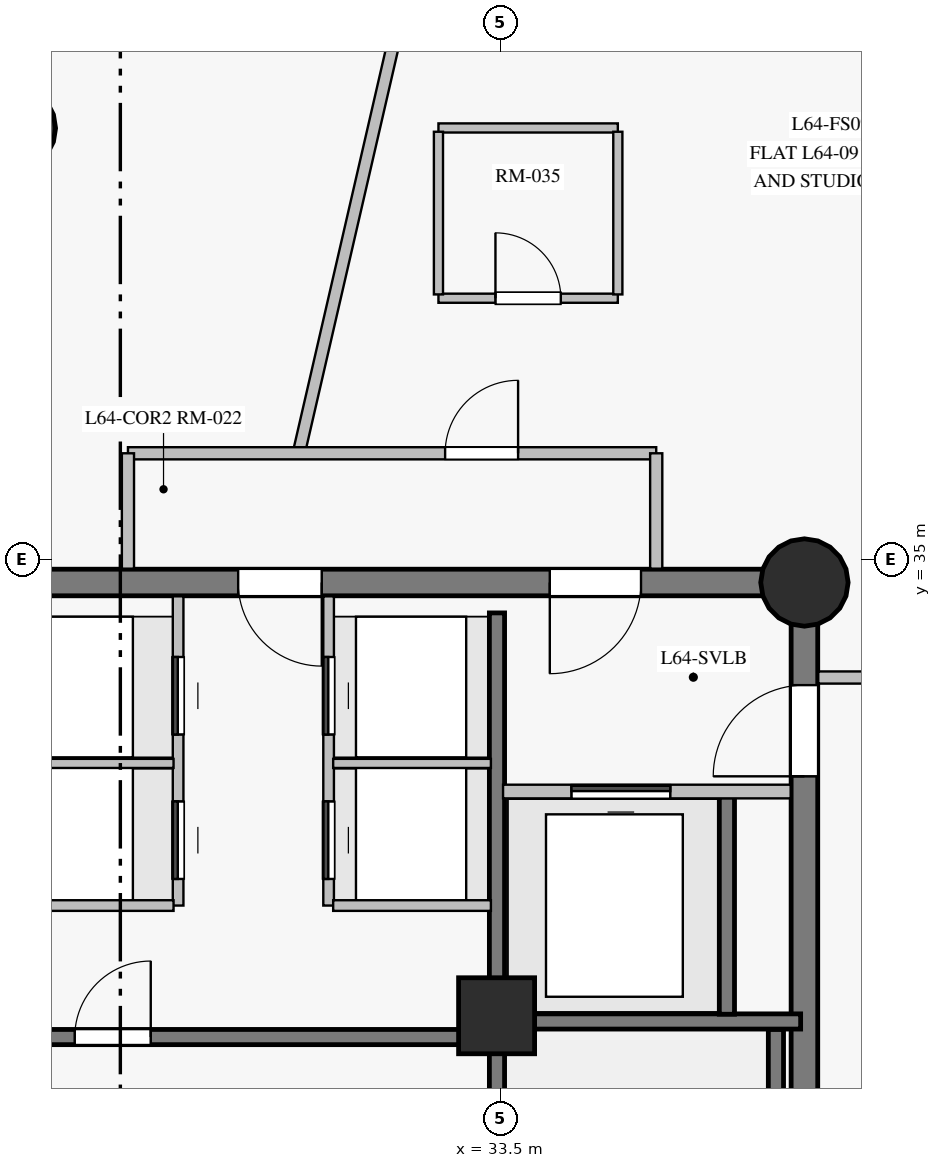
"""IFC4 building model, lengths in metres.
Left out: names, types, materials, properties, quantities, classifications, styles, units other than length and angle.
Written with IfcOpenShell. Run it as: python <this file> out.ifc"""

import sys

from ifc_helpers import new_model, si_unit, direction, frame, frame_2d, origin, origin_with_axes, origin_2d, place, context, subcontext, project, spatial, rectangle, circle, extrude, source, transform, mapped, element, fill, save


model = new_model("IFC4")
c1 = context("Model", 3, precision=1e-05, world=origin(), true_north=direction((0.0, 1.0)))
c2 = subcontext(c1, "Body", "Model", "MODEL_VIEW")
j1 = project(units=[si_unit("LENGTHUNIT", "METRE"), si_unit("PLANEANGLEUNIT", "RADIAN")], contexts=[c1])
p1 = place(None, origin())
s1 = spatial("IfcSite", under=j1, at=p1, CompositionType="ELEMENT")
p2 = place(p1, origin())
s2 = spatial("IfcBuilding", under=s1, at=p2, CompositionType="ELEMENT")
p3 = place(p2, frame((0.0, 0.0, 219.95)))
s3 = spatial("IfcBuildingStorey", under=s2, at=p3, CompositionType="ELEMENT", Elevation=219.95)
p4 = place(p3, frame((37.5, 18.3, 0.0), z_axis=(0.0, 0.0, 1.0), x_axis=(0.0, 1.0, 0.0)))
e1 = element("IfcWall", 1, at=p4, inside=s3, PredefinedType="SHEAR", context=c2, shape_type="SweptSolid", body=[
    extrude(rectangle(XDim=16.4, YDim=0.35, at=frame_2d((8.2, 0.0))), origin(), (0.0, 0.0, 1.0), 2.85),
])
p5 = place(p4, frame((13.85, 0.0, 0.0)))
e2 = element("IfcOpeningElement", 2, at=p5, cuts=e1, PredefinedType="OPENING", context=c2, shape_type="SweptSolid", body=[
    extrude(rectangle(XDim=1.2, YDim=2.15, at=frame_2d((0.6, 1.075))), frame((0.0, 0.185, 0.0), z_axis=(0.0, -1.0, 0.0), x_axis=(1.0, 0.0, 0.0)), (0.0, 0.0, 1.0), 0.37),
])
p6 = place(p3, frame((37.5, 34.7, 0.0), z_axis=(0.0, 0.0, 1.0), x_axis=(-1.0, 0.0, 0.0)))
e3 = element("IfcWall", 3, at=p6, inside=s3, PredefinedType="SHEAR", context=c2, shape_type="SweptSolid", body=[
    extrude(rectangle(XDim=10.95, YDim=0.35, at=frame_2d((5.475, 0.0))), origin(), (0.0, 0.0, 1.0), 2.85),
])
p7 = place(p6, frame((2.15, 0.0, 0.0)))
e4 = element("IfcOpeningElement", 4, at=p7, cuts=e3, PredefinedType="OPENING", context=c2, shape_type="SweptSolid", body=[
    extrude(rectangle(XDim=1.2, YDim=2.15, at=frame_2d((0.6, 1.075))), frame((0.0, 0.185, 0.0), z_axis=(0.0, -1.0, 0.0), x_axis=(1.0, 0.0, 0.0)), (0.0, 0.0, 1.0), 0.37),
])
p8 = place(p6, frame((6.35, 0.0, 0.0)))
e5 = element("IfcOpeningElement", 5, at=p8, cuts=e3, PredefinedType="OPENING", context=c2, shape_type="SweptSolid", body=[
    extrude(rectangle(XDim=1.1, YDim=2.15, at=frame_2d((0.55, 1.075))), frame((0.0, 0.185, 0.0), z_axis=(0.0, -1.0, 0.0), x_axis=(1.0, 0.0, 0.0)), (0.0, 0.0, 1.0), 0.37),
])
m1 = source(origin_with_axes(), c2, "Body", "SweptSolid", [
    extrude(circle(Radius=0.575, at=origin_2d()), origin(), (0.0, 0.0, 1.0), 3.05),
])
p9 = place(p3, frame((37.5, 34.7, 0.0), z_axis=(0.0, 0.0, 1.0), x_axis=(1.0, 0.0, 0.0)))
e6 = element("IfcColumn", 6, at=p9, inside=s3, PredefinedType="COLUMN", context=c2, shape_type="MappedRepresentation", body=[
    mapped(m1, transform((0.0, 0.0, 0.0), scale=1.0)),
])
m2 = source(origin_with_axes(), c2, "Body", "SweptSolid", [
    extrude(rectangle(XDim=1.0, YDim=1.0, at=origin_2d()), origin(), (0.0, 0.0, 1.0), 3.05),
])
p10 = place(p3, frame((33.45, 29.0, 0.0), z_axis=(0.0, 0.0, 1.0), x_axis=(1.0, 0.0, 0.0)))
e7 = element("IfcColumn", 7, at=p10, inside=s3, PredefinedType="COLUMN", context=c2, shape_type="MappedRepresentation", body=[
    mapped(m2, transform((0.0, 0.0, 0.0), scale=1.0)),
])
p11 = place(p3, frame((27.073, 40.677, 0.0), z_axis=(0.0, 0.0, 1.0), x_axis=(1.0, 0.0, 0.0)))
e8 = element("IfcColumn", 8, at=p11, inside=s3, PredefinedType="COLUMN", context=c2, shape_type="MappedRepresentation", body=[
    mapped(m1, transform((0.0, 0.0, 0.0), scale=1.0)),
])
p12 = place(p3, frame((33.455, 18.7, 0.0), z_axis=(0.0, 0.0, 1.0), x_axis=(0.0, 1.0, 0.0)))
e9 = element("IfcWall", 9, at=p12, inside=s3, PredefinedType="SHEAR", context=c2, shape_type="SweptSolid", body=[
    extrude(rectangle(XDim=15.6, YDim=0.2, at=frame_2d((7.8, 0.0))), origin(), (0.0, 0.0, 1.0), 2.85),
])
p13 = place(p12, frame((2.75, 0.0, 0.0)))
e10 = element("IfcOpeningElement", 10, at=p13, cuts=e9, PredefinedType="OPENING", context=c2, shape_type="SweptSolid", body=[
    extrude(rectangle(XDim=1.15, YDim=2.15, at=frame_2d((0.575, 1.075))), frame((0.0, 0.11, 0.0), z_axis=(0.0, -1.0, 0.0), x_axis=(1.0, 0.0, 0.0)), (0.0, 0.0, 1.0), 0.22),
])
p14 = place(p12, frame((0.55, 0.0, 0.0)))
e11 = element("IfcOpeningElement", 11, at=p14, cuts=e9, PredefinedType="OPENING", context=c2, shape_type="SweptSolid", body=[
    extrude(rectangle(XDim=0.94, YDim=2.1, at=frame_2d((0.47, 1.05))), frame((0.0, 0.11, 0.0), z_axis=(0.0, -1.0, 0.0), x_axis=(1.0, 0.0, 0.0)), (0.0, 0.0, 1.0), 0.22),
])
p15 = place(p3, frame((23.7, 28.72, 0.0), z_axis=(0.0, 0.0, 1.0), x_axis=(1.0, 0.0, 0.0)))
e12 = element("IfcWall", 12, at=p15, inside=s3, PredefinedType="SHEAR", context=c2, shape_type="SweptSolid", body=[
    extrude(rectangle(XDim=9.6, YDim=0.2, at=frame_2d((4.8, 0.0))), origin(), (0.0, 0.0, 1.0), 2.85),
])
p16 = place(p15, frame((4.2, 0.0, 0.0)))
e13 = element("IfcOpeningElement", 13, at=p16, cuts=e12, PredefinedType="OPENING", context=c2, shape_type="SweptSolid", body=[
    extrude(rectangle(XDim=1.0, YDim=2.15, at=frame_2d((0.5, 1.075))), frame((0.0, 0.11, 0.0), z_axis=(0.0, -1.0, 0.0), x_axis=(1.0, 0.0, 0.0)), (0.0, 0.0, 1.0), 0.22),
])
p17 = place(p3, frame((37.125, 21.32, 0.0), z_axis=(0.0, 0.0, 1.0), x_axis=(0.0, 1.0, 0.0)))
e14 = element("IfcWall", 14, at=p17, inside=s3, PredefinedType="SHEAR", context=c2, shape_type="SweptSolid", body=[
    extrude(rectangle(XDim=7.5, YDim=0.2, at=frame_2d((3.75, 0.0))), origin(), (0.0, 0.0, 1.0), 2.85),
])
p18 = place(p3, frame((33.455, 28.925, 0.0), z_axis=(0.0, 0.0, 1.0), x_axis=(1.0, 0.0, 0.0)))
e15 = element("IfcWall", 15, at=p18, inside=s3, PredefinedType="SHEAR", context=c2, shape_type="SweptSolid", body=[
    extrude(rectangle(XDim=3.995, YDim=0.2, at=frame_2d((1.998, 0.0))), origin(), (0.0, 0.0, 1.0), 2.85),
])
p19 = place(p3, frame((36.48, 29.02, 0.0), z_axis=(0.0, 0.0, 1.0), x_axis=(0.0, 1.0, 0.0)))
e16 = element("IfcWall", 16, at=p19, inside=s3, PredefinedType="SHEAR", context=c2, shape_type="SweptSolid", body=[
    extrude(rectangle(XDim=2.86, YDim=0.2, at=frame_2d((1.43, 0.0))), origin(), (0.0, 0.0, 1.0), 2.85),
])
p20 = place(p3, frame((30.84, 36.371, 0.0), z_axis=(0.0, 0.0, 1.0), x_axis=(0.224958696118, 0.974368300511, 0.0)))
e17 = element("IfcWall", 17, at=p20, inside=s3, PredefinedType="PARTITIONING", context=c2, shape_type="SweptSolid", body=[
    extrude(rectangle(XDim=11.864, YDim=0.16, at=frame_2d((5.932, 0.0))), origin(), (0.0, 0.0, 1.0), 2.85),
])
p21 = place(p3, frame((28.6, 36.4, 0.0), z_axis=(0.0, 0.0, 1.0), x_axis=(1.0, 0.0, 0.0)))
e18 = element("IfcWall", 18, at=p21, inside=s3, PredefinedType="PARTITIONING", context=c2, shape_type="SweptSolid", body=[
    extrude(rectangle(XDim=6.95, YDim=0.16, at=frame_2d((3.475, 0.0))), origin(), (0.0, 0.0, 1.0), 2.45),
])
p22 = place(p21, frame((4.173, 0.0, 0.0)))
e19 = element("IfcOpeningElement", 19, at=p22, cuts=e18, PredefinedType="OPENING", context=c2, shape_type="SweptSolid", body=[
    extrude(rectangle(XDim=0.96, YDim=2.15, at=frame_2d((0.48, 1.075))), frame((0.0, 0.09, 0.0), z_axis=(0.0, -1.0, 0.0), x_axis=(1.0, 0.0, 0.0)), (0.0, 0.0, 1.0), 0.18),
])
p23 = place(p3, frame((37.682, 33.45, 0.0), z_axis=(0.0, 0.0, 1.0), x_axis=(1.0, 0.0, 0.0)))
e20 = element("IfcWall", 20, at=p23, inside=s3, PredefinedType="PARTITIONING", context=c2, shape_type="SweptSolid", body=[
    extrude(rectangle(XDim=4.118, YDim=0.16, at=frame_2d((2.059, 0.0))), origin(), (0.0, 0.0, 1.0), 2.85),
])
p24 = place(p3, frame((29.26, 30.45, 0.0), z_axis=(0.0, 0.0, 1.0), x_axis=(0.0, 1.0, 0.0)))
e21 = element("IfcWall", 21, at=p24, inside=s3, PredefinedType="PARTITIONING", context=c2, shape_type="SweptSolid", body=[
    extrude(rectangle(XDim=4.068, YDim=0.14, at=frame_2d((2.034, 0.0))), origin(), (0.0, 0.0, 1.0), 2.85),
])
p25 = place(p24, frame((0.35, 0.0, 0.0)))
e22 = element("IfcOpeningElement", 22, at=p25, cuts=e21, PredefinedType="OPENING", context=c2, shape_type="SweptSolid", body=[
    extrude(rectangle(XDim=1.02, YDim=2.15, at=frame_2d((0.51, 1.075))), frame((0.0, 0.08, 0.0), z_axis=(0.0, -1.0, 0.0), x_axis=(1.0, 0.0, 0.0)), (0.0, 0.0, 1.0), 0.16),
])
p26 = place(p24, frame((2.25, 0.0, 0.0)))
e23 = element("IfcOpeningElement", 23, at=p26, cuts=e21, PredefinedType="OPENING", context=c2, shape_type="SweptSolid", body=[
    extrude(rectangle(XDim=1.02, YDim=2.15, at=frame_2d((0.51, 1.075))), frame((0.0, 0.08, 0.0), z_axis=(0.0, -1.0, 0.0), x_axis=(1.0, 0.0, 0.0)), (0.0, 0.0, 1.0), 0.16),
])
p27 = place(p3, frame((31.24, 30.45, 0.0), z_axis=(0.0, 0.0, 1.0), x_axis=(0.0, 1.0, 0.0)))
e24 = element("IfcWall", 24, at=p27, inside=s3, PredefinedType="PARTITIONING", context=c2, shape_type="SweptSolid", body=[
    extrude(rectangle(XDim=4.068, YDim=0.14, at=frame_2d((2.034, 0.0))), origin(), (0.0, 0.0, 1.0), 2.85),
])
p28 = place(p27, frame((0.35, 0.0, 0.0)))
e25 = element("IfcOpeningElement", 25, at=p28, cuts=e24, PredefinedType="OPENING", context=c2, shape_type="SweptSolid", body=[
    extrude(rectangle(XDim=1.02, YDim=2.15, at=frame_2d((0.51, 1.075))), frame((0.0, 0.08, 0.0), z_axis=(0.0, -1.0, 0.0), x_axis=(1.0, 0.0, 0.0)), (0.0, 0.0, 1.0), 0.16),
])
p29 = place(p27, frame((2.25, 0.0, 0.0)))
e26 = element("IfcOpeningElement", 26, at=p29, cuts=e24, PredefinedType="OPENING", context=c2, shape_type="SweptSolid", body=[
    extrude(rectangle(XDim=1.02, YDim=2.15, at=frame_2d((0.51, 1.075))), frame((0.0, 0.08, 0.0), z_axis=(0.0, -1.0, 0.0), x_axis=(1.0, 0.0, 0.0)), (0.0, 0.0, 1.0), 0.16),
])
p30 = place(p3, frame((33.535, 31.95, 0.0), z_axis=(0.0, 0.0, 1.0), x_axis=(1.0, 0.0, 0.0)))
e27 = element("IfcWall", 27, at=p30, inside=s3, PredefinedType="PARTITIONING", context=c2, shape_type="SweptSolid", body=[
    extrude(rectangle(XDim=3.784, YDim=0.18, at=frame_2d((1.892, 0.0))), origin(), (0.0, 0.0, 1.0), 2.85),
])
p31 = place(p30, frame((0.9, 0.0, 0.0)))
e28 = element("IfcOpeningElement", 28, at=p31, cuts=e27, PredefinedType="OPENING", context=c2, shape_type="SweptSolid", body=[
    extrude(rectangle(XDim=1.3, YDim=2.2, at=frame_2d((0.65, 1.1))), frame((0.0, 0.1, 0.0), z_axis=(0.0, -1.0, 0.0), x_axis=(1.0, 0.0, 0.0)), (0.0, 0.0, 1.0), 0.2),
])
p32 = place(p3, frame((26.62, 30.45, 0.0), z_axis=(0.0, 0.0, 1.0), x_axis=(1.0, 0.0, 0.0)))
e29 = element("IfcWall", 29, at=p32, inside=s3, PredefinedType="PARTITIONING", context=c2, shape_type="SweptSolid", body=[
    extrude(rectangle(XDim=2.58, YDim=0.14, at=frame_2d((1.29, 0.0))), origin(), (0.0, 0.0, 1.0), 2.85),
])
p33 = place(p3, frame((26.62, 32.32, 0.0), z_axis=(0.0, 0.0, 1.0), x_axis=(1.0, 0.0, 0.0)))
e30 = element("IfcWall", 30, at=p33, inside=s3, PredefinedType="PARTITIONING", context=c2, shape_type="SweptSolid", body=[
    extrude(rectangle(XDim=2.58, YDim=0.12, at=frame_2d((1.29, 0.0))), origin(), (0.0, 0.0, 1.0), 2.85),
])
p34 = place(p3, frame((32.685, 38.44, 0.0), z_axis=(0.0, 0.0, 1.0), x_axis=(1.0, 0.0, 0.0)))
e31 = element("IfcWall", 31, at=p34, inside=s3, PredefinedType="PARTITIONING", context=c2, shape_type="SweptSolid", body=[
    extrude(rectangle(XDim=2.36, YDim=0.12, at=frame_2d((1.18, 0.0))), origin(), (0.0, 0.0, 1.0), 2.3),
])
p35 = place(p34, frame((0.75, 0.0, 0.0)))
e32 = element("IfcOpeningElement", 32, at=p35, cuts=e31, PredefinedType="OPENING", context=c2, shape_type="SweptSolid", body=[
    extrude(rectangle(XDim=0.86, YDim=2.1, at=frame_2d((0.43, 1.05))), frame((0.0, 0.07, 0.0), z_axis=(0.0, -1.0, 0.0), x_axis=(1.0, 0.0, 0.0)), (0.0, 0.0, 1.0), 0.14),
])
p36 = place(p3, frame((35.045, 40.68, 0.0), z_axis=(0.0, 0.0, 1.0), x_axis=(-1.0, 0.0, 0.0)))
e33 = element("IfcWall", 33, at=p36, inside=s3, PredefinedType="PARTITIONING", context=c2, shape_type="SweptSolid", body=[
    extrude(rectangle(XDim=2.36, YDim=0.12, at=frame_2d((1.18, 0.0))), origin(), (0.0, 0.0, 1.0), 2.85),
])
for number, where, z_axis, x_axis in (
    (34, (35.045, 38.49, 0.0), (0.0, 0.0, 1.0), (0.0, 1.0, 0.0)),
    (35, (32.685, 40.63, 0.0), (0.0, 0.0, 1.0), (0.0, -1.0, 0.0)),
):
    element("IfcWall", number, at=place(p3, frame(where, z_axis=z_axis, x_axis=x_axis)), inside=s3, PredefinedType="PARTITIONING", context=c2, shape_type="SweptSolid", body=[
        extrude(rectangle(XDim=2.14, YDim=0.12, at=frame_2d((1.07, 0.0))), origin(), (0.0, 0.0, 1.0), 2.85),
    ])
p37 = place(p3, frame((31.3, 30.45, 0.0), z_axis=(0.0, 0.0, 1.0), x_axis=(1.0, 0.0, 0.0)))
e36 = element("IfcWall", 36, at=p37, inside=s3, PredefinedType="PARTITIONING", context=c2, shape_type="SweptSolid", body=[
    extrude(rectangle(XDim=2.075, YDim=0.14, at=frame_2d((1.038, 0.0))), origin(), (0.0, 0.0, 1.0), 2.85),
])
p38 = place(p3, frame((31.3, 32.32, 0.0), z_axis=(0.0, 0.0, 1.0), x_axis=(1.0, 0.0, 0.0)))
e37 = element("IfcWall", 37, at=p38, inside=s3, PredefinedType="PARTITIONING", context=c2, shape_type="SweptSolid", body=[
    extrude(rectangle(XDim=2.075, YDim=0.12, at=frame_2d((1.038, 0.0))), origin(), (0.0, 0.0, 1.0), 2.85),
])
for number, where, z_axis, x_axis in (
    (38, (28.6, 34.882, 0.0), (0.0, 0.0, 1.0), (0.0, 1.0, 0.0)),
    (39, (35.55, 36.4, 0.0), (0.0, 0.0, 1.0), (0.0, -1.0, 0.0)),
):
    element("IfcWall", number, at=place(p3, frame(where, z_axis=z_axis, x_axis=x_axis)), inside=s3, PredefinedType="PARTITIONING", context=c2, shape_type="SweptSolid", body=[
        extrude(rectangle(XDim=1.518, YDim=0.16, at=frame_2d((0.759, 0.0))), origin(), (0.0, 0.0, 1.0), 2.85),
    ])
m3 = source(origin_with_axes(), c2, "Body", "SweptSolid", [
    extrude(rectangle(XDim=1.2, YDim=2.15, at=frame_2d((0.6, 1.075))), frame((0.0, 0.025, 0.0), z_axis=(0.0, -1.0, 0.0), x_axis=(1.0, 0.0, 0.0)), (0.0, 0.0, 1.0), 0.05),
])
p39 = place(p5, origin())
e40 = element("IfcDoor", 40, at=p39, inside=s3, OperationType="SINGLE_SWING_LEFT", PredefinedType="DOOR", context=c2, shape_type="MappedRepresentation", body=[
    mapped(m3, transform((0.0, 0.0, 0.0), scale=1.0)),
])
fill(e2, e40)
p40 = place(p7, origin())
e41 = element("IfcDoor", 41, at=p40, inside=s3, OperationType="SINGLE_SWING_RIGHT", PredefinedType="DOOR", context=c2, shape_type="MappedRepresentation", body=[
    mapped(m3, transform((0.0, 0.0, 0.0), scale=1.0)),
])
fill(e4, e41)
m4 = source(origin_with_axes(), c2, "Body", "SweptSolid", [
    extrude(rectangle(XDim=1.3, YDim=2.2, at=frame_2d((0.65, 1.1))), frame((0.0, 0.025, 0.0), z_axis=(0.0, -1.0, 0.0), x_axis=(1.0, 0.0, 0.0)), (0.0, 0.0, 1.0), 0.05),
])
p41 = place(p31, origin())
e42 = element("IfcDoor", 42, at=p41, inside=s3, OperationType="SLIDING_TO_LEFT", PredefinedType="DOOR", context=c2, shape_type="MappedRepresentation", body=[
    mapped(m4, transform((0.0, 0.0, 0.0), scale=1.0)),
])
fill(e28, e42)
m5 = source(origin_with_axes(), c2, "Body", "SweptSolid", [
    extrude(rectangle(XDim=1.0, YDim=2.15, at=frame_2d((0.5, 1.075))), frame((0.0, 0.025, 0.0), z_axis=(0.0, -1.0, 0.0), x_axis=(1.0, 0.0, 0.0)), (0.0, 0.0, 1.0), 0.05),
])
p42 = place(p16, origin())
e43 = element("IfcDoor", 43, at=p42, inside=s3, OperationType="SINGLE_SWING_RIGHT", PredefinedType="DOOR", context=c2, shape_type="MappedRepresentation", body=[
    mapped(m5, transform((0.0, 0.0, 0.0), scale=1.0)),
])
fill(e13, e43)
m6 = source(origin_with_axes(), c2, "Body", "SweptSolid", [
    extrude(rectangle(XDim=1.1, YDim=2.15, at=frame_2d((0.55, 1.075))), frame((0.0, 0.025, 0.0), z_axis=(0.0, -1.0, 0.0), x_axis=(1.0, 0.0, 0.0)), (0.0, 0.0, 1.0), 0.05),
])
p43 = place(p8, origin())
e44 = element("IfcDoor", 44, at=p43, inside=s3, OperationType="SINGLE_SWING_LEFT", PredefinedType="DOOR", context=c2, shape_type="MappedRepresentation", body=[
    mapped(m6, transform((0.0, 0.0, 0.0), scale=1.0)),
])
fill(e5, e44)
m7 = source(origin_with_axes(), c2, "Body", "SweptSolid", [
    extrude(rectangle(XDim=1.02, YDim=2.15, at=frame_2d((0.51, 1.075))), frame((0.0, 0.025, 0.0), z_axis=(0.0, -1.0, 0.0), x_axis=(1.0, 0.0, 0.0)), (0.0, 0.0, 1.0), 0.05),
])
p44 = place(p25, origin())
e45 = element("IfcDoor", 45, at=p44, inside=s3, OperationType="SLIDING_TO_LEFT", PredefinedType="DOOR", context=c2, shape_type="MappedRepresentation", body=[
    mapped(m7, transform((0.0, 0.0, 0.0), scale=1.0)),
])
fill(e22, e45)
p45 = place(p26, origin())
e46 = element("IfcDoor", 46, at=p45, inside=s3, OperationType="SLIDING_TO_LEFT", PredefinedType="DOOR", context=c2, shape_type="MappedRepresentation", body=[
    mapped(m7, transform((0.0, 0.0, 0.0), scale=1.0)),
])
fill(e23, e46)
p46 = place(p28, origin())
e47 = element("IfcDoor", 47, at=p46, inside=s3, OperationType="SLIDING_TO_LEFT", PredefinedType="DOOR", context=c2, shape_type="MappedRepresentation", body=[
    mapped(m7, transform((0.0, 0.0, 0.0), scale=1.0)),
])
fill(e25, e47)
p47 = place(p29, origin())
e48 = element("IfcDoor", 48, at=p47, inside=s3, OperationType="SLIDING_TO_LEFT", PredefinedType="DOOR", context=c2, shape_type="MappedRepresentation", body=[
    mapped(m7, transform((0.0, 0.0, 0.0), scale=1.0)),
])
fill(e26, e48)
m8 = source(origin_with_axes(), c2, "Body", "SweptSolid", [
    extrude(rectangle(XDim=0.86, YDim=2.1, at=frame_2d((0.43, 1.05))), frame((0.0, 0.025, 0.0), z_axis=(0.0, -1.0, 0.0), x_axis=(1.0, 0.0, 0.0)), (0.0, 0.0, 1.0), 0.05),
])
p48 = place(p35, origin())
e49 = element("IfcDoor", 49, at=p48, inside=s3, OperationType="SINGLE_SWING_LEFT", PredefinedType="DOOR", context=c2, shape_type="MappedRepresentation", body=[
    mapped(m8, transform((0.0, 0.0, 0.0), scale=1.0)),
])
fill(e32, e49)
m9 = source(origin_with_axes(), c2, "Body", "SweptSolid", [
    extrude(rectangle(XDim=0.96, YDim=2.15, at=frame_2d((0.48, 1.075))), frame((0.0, 0.025, 0.0), z_axis=(0.0, -1.0, 0.0), x_axis=(1.0, 0.0, 0.0)), (0.0, 0.0, 1.0), 0.05),
])
p49 = place(p22, origin())
e50 = element("IfcDoor", 50, at=p49, inside=s3, OperationType="SINGLE_SWING_RIGHT", PredefinedType="DOOR", context=c2, shape_type="MappedRepresentation", body=[
    mapped(m9, transform((0.0, 0.0, 0.0), scale=1.0)),
])
fill(e19, e50)
save(model, sys.argv[1])
